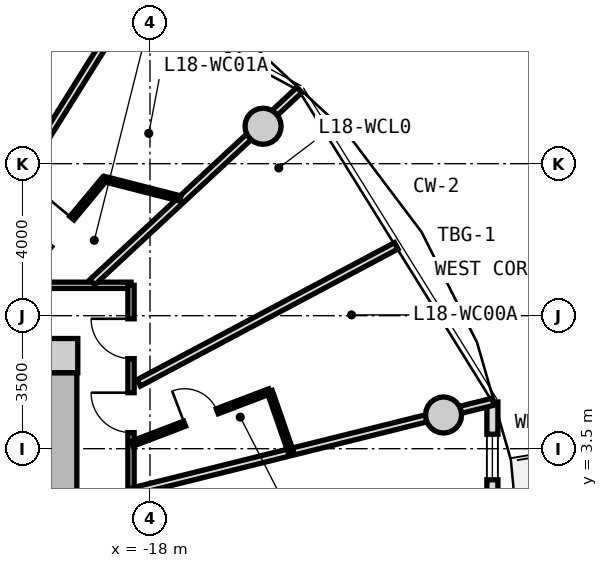
"""IFC4 building model, lengths in metres.
Left out: names, types, materials, properties, quantities, classifications, styles, units other than length and angle.
Written with IfcOpenShell. Run it as: python <this file> out.ifc"""

import sys

from ifc_helpers import new_model, si_unit, direction, frame, frame_2d, origin, origin_2d, place, context, subcontext, project, spatial, rectangle, circle, extrude, source, transform, mapped, element, fill, save


model = new_model("IFC4")
c1 = context("Model", 3, precision=1e-05, world=origin(), true_north=direction((0.0, 1.0)))
c2 = subcontext(c1, "Body", "Model", "MODEL_VIEW")
j1 = project(units=[si_unit("LENGTHUNIT", "METRE"), si_unit("PLANEANGLEUNIT", "RADIAN")], contexts=[c1])
p1 = place(None, origin())
s1 = spatial("IfcSite", under=j1, at=p1, CompositionType="ELEMENT")
p2 = place(p1, origin())
s2 = spatial("IfcBuilding", under=s1, at=p2, CompositionType="ELEMENT")
p3 = place(p2, frame((0.0, 0.0, 61.25)))
s3 = spatial("IfcBuildingStorey", under=s2, at=p3, CompositionType="ELEMENT", Elevation=61.25)
m1 = source(origin(), c2, "Body", "SweptSolid", [
    extrude(rectangle(XDim=0.9, YDim=0.9, at=origin_2d()), origin(), (0.0, 0.0, 1.0), 3.05),
])
p4 = place(p3, frame((-20.35, 5.95, 0.0), z_axis=(0.0, 0.0, 1.0), x_axis=(1.0, 0.0, 0.0)))
e1 = element("IfcColumn", 1, at=p4, inside=s3, PredefinedType="COLUMN", context=c2, shape_type="MappedRepresentation", body=[
    mapped(m1, transform((0.0, 0.0, 0.0), x_axis=(1.0, 0.0, 0.0), y_axis=(0.0, 1.0, 0.0), z_axis=(0.0, 0.0, 1.0), scale=1.0)),
])
m2 = source(origin(), c2, "Body", "SweptSolid", [
    extrude(rectangle(XDim=11.0, YDim=0.85, at=frame_2d((5.5, 0.0))), origin(), (0.0, 0.0, 1.0), 2.79),
])
p5 = place(p3, frame((-20.35, 5.5, 0.0), z_axis=(0.0, 0.0, 1.0), x_axis=(0.0, -1.0, 0.0)))
e2 = element("IfcWall", 2, at=p5, inside=s3, PredefinedType="SHEAR", context=c2, shape_type="MappedRepresentation", body=[
    mapped(m2, transform((0.0, 0.0, 0.0), x_axis=(1.0, 0.0, 0.0), y_axis=(0.0, 1.0, 0.0), z_axis=(0.0, 0.0, 1.0), scale=1.0)),
])
p6 = place(p5, frame((5.65, 0.0, 0.0)))
e3 = element("IfcOpeningElement", 3, at=p6, cuts=e2, PredefinedType="OPENING", context=c2, shape_type="SweptSolid", body=[
    extrude(rectangle(XDim=1.2, YDim=2.15, at=frame_2d((0.6, 1.075))), frame((0.0, 0.435, 0.0), z_axis=(0.0, -1.0, 0.0), x_axis=(1.0, 0.0, 0.0)), (0.0, 0.0, 1.0), 0.87),
])
m3 = source(origin(), c2, "Body", "SweptSolid", [
    extrude(circle(Radius=0.475, at=origin_2d()), origin(), (0.0, 0.0, 1.0), 3.05),
])
for number, where, z_axis, x_axis in (
    (4, (-10.275, 4.387, 0.0), (0.0, 0.0, 1.0), (1.0, 0.0, 0.0)),
    (5, (-15.025, 11.985, 0.0), (0.0, 0.0, 1.0), (1.0, 0.0, 0.0)),
):
    element("IfcColumn", number, at=place(p3, frame(where, z_axis=z_axis, x_axis=x_axis)), inside=s3, PredefinedType="COLUMN", context=c2, shape_type="MappedRepresentation", body=[
        mapped(m3, transform((0.0, 0.0, 0.0), x_axis=(1.0, 0.0, 0.0), y_axis=(0.0, 1.0, 0.0), z_axis=(0.0, 0.0, 1.0), scale=1.0)),
    ])
m4 = source(origin(), c2, "Body", "SweptSolid", [
    extrude(rectangle(XDim=9.462, YDim=0.29, at=frame_2d((4.731, 0.0))), origin(), (0.0, 0.0, 1.0), 2.79),
])
p7 = place(p3, frame((-8.99, 4.731, 0.0), z_axis=(0.0, 0.0, 1.0), x_axis=(0.0, -1.0, 0.0)))
e6 = element("IfcWall", 6, at=p7, inside=s3, PredefinedType="SOLIDWALL", context=c2, shape_type="MappedRepresentation", body=[
    mapped(m4, transform((0.0, 0.0, 0.0), x_axis=(1.0, 0.0, 0.0), y_axis=(0.0, 1.0, 0.0), z_axis=(0.0, 0.0, 1.0), scale=1.0)),
])
p8 = place(p7, frame((7.3, 0.0, 0.0)))
e7 = element("IfcOpeningElement", 7, at=p8, cuts=e6, PredefinedType="OPENING", context=c2, shape_type="SweptSolid", body=[
    extrude(rectangle(XDim=1.15, YDim=2.25, at=frame_2d((0.575, 1.125))), frame((0.0, 0.155, 0.0), z_axis=(0.0, -1.0, 0.0), x_axis=(1.0, 0.0, 0.0)), (0.0, 0.0, 1.0), 0.31),
])
p9 = place(p7, frame((0.85, 0.0, 0.85)))
e8 = element("IfcOpeningElement", 8, at=p9, cuts=e6, PredefinedType="OPENING", context=c2, shape_type="SweptSolid", body=[
    extrude(rectangle(XDim=1.2, YDim=1.5, at=frame_2d((0.6, 0.75))), frame((0.0, 0.155, 0.0), z_axis=(0.0, -1.0, 0.0), x_axis=(1.0, 0.0, 0.0)), (0.0, 0.0, 1.0), 0.31),
])
m5 = source(origin(), c2, "Body", "SweptSolid", [
    extrude(rectangle(XDim=19.0, YDim=0.165, at=frame_2d((9.5, 0.0))), origin(), (0.0, 0.0, 1.0), 2.775),
])
p10 = place(p3, frame((-37.5, 7.8, 0.0), z_axis=(0.0, 0.0, 1.0), x_axis=(1.0, 0.0, 0.0)))
e9 = element("IfcWall", 9, at=p10, inside=s3, PredefinedType="PARTITIONING", context=c2, shape_type="MappedRepresentation", body=[
    mapped(m5, transform((0.0, 0.0, 0.0), x_axis=(1.0, 0.0, 0.0), y_axis=(0.0, 1.0, 0.0), z_axis=(0.0, 0.0, 1.0), scale=1.0)),
])
p11 = place(p10, frame((14.653, 0.0, 0.0)))
e10 = element("IfcOpeningElement", 10, at=p11, cuts=e9, PredefinedType="OPENING", context=c2, shape_type="SweptSolid", body=[
    extrude(rectangle(XDim=1.05, YDim=2.15, at=frame_2d((0.525, 1.075))), frame((0.0, 0.093, 0.0), z_axis=(0.0, -1.0, 0.0), x_axis=(1.0, 0.0, 0.0)), (0.0, 0.0, 1.0), 0.185),
])
p12 = place(p10, frame((12.5, 0.0, 0.0)))
e11 = element("IfcOpeningElement", 11, at=p12, cuts=e9, PredefinedType="OPENING", context=c2, shape_type="SweptSolid", body=[
    extrude(rectangle(XDim=1.05, YDim=2.15, at=frame_2d((0.525, 1.075))), frame((0.0, 0.093, 0.0), z_axis=(0.0, -1.0, 0.0), x_axis=(1.0, 0.0, 0.0)), (0.0, 0.0, 1.0), 0.185),
])
p13 = place(p10, frame((9.352, 0.0, 0.0)))
e12 = element("IfcOpeningElement", 12, at=p13, cuts=e9, PredefinedType="OPENING", context=c2, shape_type="SweptSolid", body=[
    extrude(rectangle(XDim=1.05, YDim=2.15, at=frame_2d((0.525, 1.075))), frame((0.0, 0.093, 0.0), z_axis=(0.0, -1.0, 0.0), x_axis=(1.0, 0.0, 0.0)), (0.0, 0.0, 1.0), 0.185),
])
p14 = place(p10, frame((7.806, 0.0, 0.0)))
e13 = element("IfcOpeningElement", 13, at=p14, cuts=e9, PredefinedType="OPENING", context=c2, shape_type="SweptSolid", body=[
    extrude(rectangle(XDim=1.05, YDim=2.15, at=frame_2d((0.525, 1.075))), frame((0.0, 0.093, 0.0), z_axis=(0.0, -1.0, 0.0), x_axis=(1.0, 0.0, 0.0)), (0.0, 0.0, 1.0), 0.185),
])
p15 = place(p10, frame((4.773, 0.0, 0.0)))
e14 = element("IfcOpeningElement", 14, at=p15, cuts=e9, PredefinedType="OPENING", context=c2, shape_type="SweptSolid", body=[
    extrude(rectangle(XDim=1.05, YDim=2.15, at=frame_2d((0.525, 1.075))), frame((0.0, 0.093, 0.0), z_axis=(0.0, -1.0, 0.0), x_axis=(1.0, 0.0, 0.0)), (0.0, 0.0, 1.0), 0.185),
])
p16 = place(p10, frame((2.251, 0.0, 0.0)))
e15 = element("IfcOpeningElement", 15, at=p16, cuts=e9, PredefinedType="OPENING", context=c2, shape_type="SweptSolid", body=[
    extrude(rectangle(XDim=1.05, YDim=2.15, at=frame_2d((0.525, 1.075))), frame((0.0, 0.093, 0.0), z_axis=(0.0, -1.0, 0.0), x_axis=(1.0, 0.0, 0.0)), (0.0, 0.0, 1.0), 0.185),
])
m6 = source(origin(), c2, "Body", "SweptSolid", [
    extrude(rectangle(XDim=15.6, YDim=0.165, at=frame_2d((7.8, 0.0))), origin(), (0.0, 0.0, 1.0), 2.775),
])
p17 = place(p3, frame((-18.5, 7.8, 0.0), z_axis=(0.0, 0.0, 1.0), x_axis=(0.0, -1.0, 0.0)))
e16 = element("IfcWall", 16, at=p17, inside=s3, PredefinedType="PARTITIONING", context=c2, shape_type="MappedRepresentation", body=[
    mapped(m6, transform((0.0, 0.0, 0.0), x_axis=(1.0, 0.0, 0.0), y_axis=(0.0, 1.0, 0.0), z_axis=(0.0, 0.0, 1.0), scale=1.0)),
])
p18 = place(p17, frame((12.141, 0.0, 0.0)))
e17 = element("IfcOpeningElement", 17, at=p18, cuts=e16, PredefinedType="OPENING", context=c2, shape_type="SweptSolid", body=[
    extrude(rectangle(XDim=1.25, YDim=2.2, at=frame_2d((0.625, 1.1))), frame((0.0, 0.093, 0.0), z_axis=(0.0, -1.0, 0.0), x_axis=(1.0, 0.0, 0.0)), (0.0, 0.0, 1.0), 0.185),
])
p19 = place(p17, frame((7.175, 0.0, 0.0)))
e18 = element("IfcOpeningElement", 18, at=p19, cuts=e16, PredefinedType="OPENING", context=c2, shape_type="SweptSolid", body=[
    extrude(rectangle(XDim=1.25, YDim=2.2, at=frame_2d((0.625, 1.1))), frame((0.0, 0.093, 0.0), z_axis=(0.0, -1.0, 0.0), x_axis=(1.0, 0.0, 0.0)), (0.0, 0.0, 1.0), 0.185),
])
p20 = place(p17, frame((2.826, 0.0, 0.0)))
e19 = element("IfcOpeningElement", 19, at=p20, cuts=e16, PredefinedType="OPENING", context=c2, shape_type="SweptSolid", body=[
    extrude(rectangle(XDim=1.05, YDim=2.15, at=frame_2d((0.525, 1.075))), frame((0.0, 0.093, 0.0), z_axis=(0.0, -1.0, 0.0), x_axis=(1.0, 0.0, 0.0)), (0.0, 0.0, 1.0), 0.185),
])
p21 = place(p17, frame((0.881, 0.0, 0.0)))
e20 = element("IfcOpeningElement", 20, at=p21, cuts=e16, PredefinedType="OPENING", context=c2, shape_type="SweptSolid", body=[
    extrude(rectangle(XDim=1.05, YDim=2.15, at=frame_2d((0.525, 1.075))), frame((0.0, 0.093, 0.0), z_axis=(0.0, -1.0, 0.0), x_axis=(1.0, 0.0, 0.0)), (0.0, 0.0, 1.0), 0.185),
])
m7 = source(origin(), c2, "Body", "SweptSolid", [
    extrude(rectangle(XDim=9.737, YDim=0.19, at=frame_2d((4.869, 0.0))), origin(), (0.0, 0.0, 1.0), 2.225),
])
p22 = place(p3, frame((-18.42, 2.385, 0.0), z_axis=(0.0, 0.0, 1.0), x_axis=(0.970392716238, 0.241532557375, 0.0)))
e21 = element("IfcWall", 21, at=p22, inside=s3, PredefinedType="PARTITIONING", context=c2, shape_type="MappedRepresentation", body=[
    mapped(m7, transform((0.0, 0.0, 0.0), x_axis=(1.0, 0.0, 0.0), y_axis=(0.0, 1.0, 0.0), z_axis=(0.0, 0.0, 1.0), scale=1.0)),
])
m8 = source(origin(), c2, "Body", "SweptSolid", [
    extrude(rectangle(XDim=7.435, YDim=0.19, at=frame_2d((3.717, 0.0))), origin(), (0.0, 0.0, 1.0), 2.225),
])
p23 = place(p3, frame((-19.517, 7.88, 0.0), z_axis=(0.0, 0.0, 1.0), x_axis=(0.732651956848, 0.680603489652, 0.0)))
e22 = element("IfcWall", 22, at=p23, inside=s3, PredefinedType="PARTITIONING", context=c2, shape_type="MappedRepresentation", body=[
    mapped(m8, transform((0.0, 0.0, 0.0), x_axis=(1.0, 0.0, 0.0), y_axis=(0.0, 1.0, 0.0), z_axis=(0.0, 0.0, 1.0), scale=1.0)),
])
m9 = source(origin(), c2, "Body", "SweptSolid", [
    extrude(rectangle(XDim=7.677, YDim=0.19, at=frame_2d((3.838, 0.0))), origin(), (0.0, 0.0, 1.0), 2.775),
])
p24 = place(p3, frame((-18.297, 5.231, 0.0), z_axis=(0.0, 0.0, 1.0), x_axis=(0.882725057546, 0.469889851753, 0.0)))
e23 = element("IfcWall", 23, at=p24, inside=s3, PredefinedType="PARTITIONING", context=c2, shape_type="MappedRepresentation", body=[
    mapped(m9, transform((0.0, 0.0, 0.0), x_axis=(1.0, 0.0, 0.0), y_axis=(0.0, 1.0, 0.0), z_axis=(0.0, 0.0, 1.0), scale=1.0)),
])
m10 = source(origin(), c2, "Body", "SweptSolid", [
    extrude(rectangle(XDim=3.874, YDim=0.14, at=frame_2d((1.937, 0.0))), origin(), (0.0, 0.0, 1.0), 2.775),
])
p25 = place(p3, frame((-18.47, 3.632, 0.0), z_axis=(0.0, 0.0, 1.0), x_axis=(0.934461775659, 0.35606346321, 0.0)))
e24 = element("IfcWall", 24, at=p25, inside=s3, PredefinedType="PARTITIONING", context=c2, shape_type="MappedRepresentation", body=[
    mapped(m10, transform((0.0, 0.0, 0.0), x_axis=(1.0, 0.0, 0.0), y_axis=(0.0, 1.0, 0.0), z_axis=(0.0, 0.0, 1.0), scale=1.0)),
])
p26 = place(p25, frame((1.477, 0.0, 0.0)))
e25 = element("IfcOpeningElement", 25, at=p26, cuts=e24, PredefinedType="OPENING", context=c2, shape_type="SweptSolid", body=[
    extrude(rectangle(XDim=0.92, YDim=2.1, at=frame_2d((0.46, 1.05))), frame((0.0, 0.08, 0.0), z_axis=(0.0, -1.0, 0.0), x_axis=(1.0, 0.0, 0.0)), (0.0, 0.0, 1.0), 0.16),
])
m11 = source(origin(), c2, "Body", "SweptSolid", [
    extrude(rectangle(XDim=1.676, YDim=0.14, at=frame_2d((0.838, 0.0))), origin(), (0.0, 0.0, 1.0), 2.775),
])
p27 = place(p3, frame((-14.85, 5.011, 0.0), z_axis=(0.0, 0.0, 1.0), x_axis=(0.327785970556, -0.944752008469, 0.0)))
e26 = element("IfcWall", 26, at=p27, inside=s3, PredefinedType="PARTITIONING", context=c2, shape_type="MappedRepresentation", body=[
    mapped(m11, transform((0.0, 0.0, 0.0), x_axis=(1.0, 0.0, 0.0), y_axis=(0.0, 1.0, 0.0), z_axis=(0.0, 0.0, 1.0), scale=1.0)),
])
m12 = source(origin(), c2, "Body", "SweptSolid", [
    extrude(rectangle(XDim=8.598, YDim=0.19, at=frame_2d((4.299, 0.0))), origin(), (0.0, 0.0, 1.0), 2.775),
])
p28 = place(p3, frame((-23.043, 8.017, 0.0), z_axis=(0.0, 0.0, 1.0), x_axis=(0.530039776395, 0.847972779893, 0.0)))
e27 = element("IfcWall", 27, at=p28, inside=s3, PredefinedType="PARTITIONING", context=c2, shape_type="MappedRepresentation", body=[
    mapped(m12, transform((0.0, 0.0, 0.0), x_axis=(1.0, 0.0, 0.0), y_axis=(0.0, 1.0, 0.0), z_axis=(0.0, 0.0, 1.0), scale=1.0)),
])
m13 = source(origin(), c2, "Body", "SweptSolid", [
    extrude(rectangle(XDim=3.594, YDim=0.14, at=frame_2d((1.797, 0.0))), origin(), (0.0, 0.0, 1.0), 2.775),
])
p29 = place(p3, frame((-21.496, 7.83, 0.0), z_axis=(0.0, 0.0, 1.0), x_axis=(0.639001147083, 0.769205781326, 0.0)))
e28 = element("IfcWall", 28, at=p29, inside=s3, PredefinedType="PARTITIONING", context=c2, shape_type="MappedRepresentation", body=[
    mapped(m13, transform((0.0, 0.0, 0.0), x_axis=(1.0, 0.0, 0.0), y_axis=(0.0, 1.0, 0.0), z_axis=(0.0, 0.0, 1.0), scale=1.0)),
])
p30 = place(p29, frame((1.337, 0.0, 0.0)))
e29 = element("IfcOpeningElement", 29, at=p30, cuts=e28, PredefinedType="OPENING", context=c2, shape_type="SweptSolid", body=[
    extrude(rectangle(XDim=0.92, YDim=2.1, at=frame_2d((0.46, 1.05))), frame((0.0, 0.08, 0.0), z_axis=(0.0, -1.0, 0.0), x_axis=(1.0, 0.0, 0.0)), (0.0, 0.0, 1.0), 0.16),
])
m14 = source(origin(), c2, "Body", "SweptSolid", [
    extrude(rectangle(XDim=2.062, YDim=0.14, at=frame_2d((1.031, 0.0))), origin(), (0.0, 0.0, 1.0), 2.415),
])
p31 = place(p3, frame((-19.199, 10.595, 0.0), z_axis=(0.0, 0.0, 1.0), x_axis=(0.968776253543, -0.247936626121, 0.0)))
e30 = element("IfcWall", 30, at=p31, inside=s3, PredefinedType="PARTITIONING", context=c2, shape_type="MappedRepresentation", body=[
    mapped(m14, transform((0.0, 0.0, 0.0), x_axis=(1.0, 0.0, 0.0), y_axis=(0.0, 1.0, 0.0), z_axis=(0.0, 0.0, 1.0), scale=1.0)),
])
m15 = source(origin(), c2, "Body", "SweptSolid", [
    extrude(rectangle(XDim=1.2, YDim=1.5, at=frame_2d((0.6, 0.75))), frame((0.0, 0.03, 0.0), z_axis=(0.0, -1.0, 0.0), x_axis=(1.0, 0.0, 0.0)), (0.0, 0.0, 1.0), 0.06),
])
p32 = place(p9, origin())
e31 = element("IfcWindow", 31, at=p32, inside=s3, PartitioningType="SINGLE_PANEL", PredefinedType="WINDOW", context=c2, shape_type="MappedRepresentation", body=[
    mapped(m15, transform((0.0, 0.0, 0.0), x_axis=(1.0, 0.0, 0.0), y_axis=(0.0, 1.0, 0.0), z_axis=(0.0, 0.0, 1.0), scale=1.0)),
])
fill(e8, e31)
m16 = source(origin(), c2, "Body", "SweptSolid", [
    extrude(rectangle(XDim=1.05, YDim=2.15, at=frame_2d((0.525, 1.075))), frame((0.0, 0.025, 0.0), z_axis=(0.0, -1.0, 0.0), x_axis=(1.0, 0.0, 0.0)), (0.0, 0.0, 1.0), 0.05),
])
p33 = place(p20, frame((1.05, 0.0, 0.0), z_axis=(0.0, 0.0, 1.0), x_axis=(-1.0, 0.0, 0.0)))
e32 = element("IfcDoor", 32, at=p33, inside=s3, OperationType="SINGLE_SWING_RIGHT", PredefinedType="DOOR", context=c2, shape_type="MappedRepresentation", body=[
    mapped(m16, transform((0.0, 0.0, 0.0), x_axis=(1.0, 0.0, 0.0), y_axis=(0.0, 1.0, 0.0), z_axis=(0.0, 0.0, 1.0), scale=1.0)),
])
fill(e19, e32)
m17 = source(origin(), c2, "Body", "SweptSolid", [
    extrude(rectangle(XDim=0.92, YDim=2.1, at=frame_2d((0.46, 1.05))), frame((0.0, 0.025, 0.0), z_axis=(0.0, -1.0, 0.0), x_axis=(1.0, 0.0, 0.0)), (0.0, 0.0, 1.0), 0.05),
])
p34 = place(p26, origin())
e33 = element("IfcDoor", 33, at=p34, inside=s3, OperationType="SINGLE_SWING_LEFT", PredefinedType="DOOR", context=c2, shape_type="MappedRepresentation", body=[
    mapped(m17, transform((0.0, 0.0, 0.0), x_axis=(1.0, 0.0, 0.0), y_axis=(0.0, 1.0, 0.0), z_axis=(0.0, 0.0, 1.0), scale=1.0)),
])
fill(e25, e33)
p35 = place(p21, frame((1.05, 0.0, 0.0), z_axis=(0.0, 0.0, 1.0), x_axis=(-1.0, 0.0, 0.0)))
e34 = element("IfcDoor", 34, at=p35, inside=s3, OperationType="SINGLE_SWING_RIGHT", PredefinedType="DOOR", context=c2, shape_type="MappedRepresentation", body=[
    mapped(m16, transform((0.0, 0.0, 0.0), x_axis=(1.0, 0.0, 0.0), y_axis=(0.0, 1.0, 0.0), z_axis=(0.0, 0.0, 1.0), scale=1.0)),
])
fill(e20, e34)
p36 = place(p30, origin())
e35 = element("IfcDoor", 35, at=p36, inside=s3, OperationType="SINGLE_SWING_RIGHT", PredefinedType="DOOR", context=c2, shape_type="MappedRepresentation", body=[
    mapped(m17, transform((0.0, 0.0, 0.0), x_axis=(1.0, 0.0, 0.0), y_axis=(0.0, 1.0, 0.0), z_axis=(0.0, 0.0, 1.0), scale=1.0)),
])
fill(e29, e35)
save(model, sys.argv[1])
